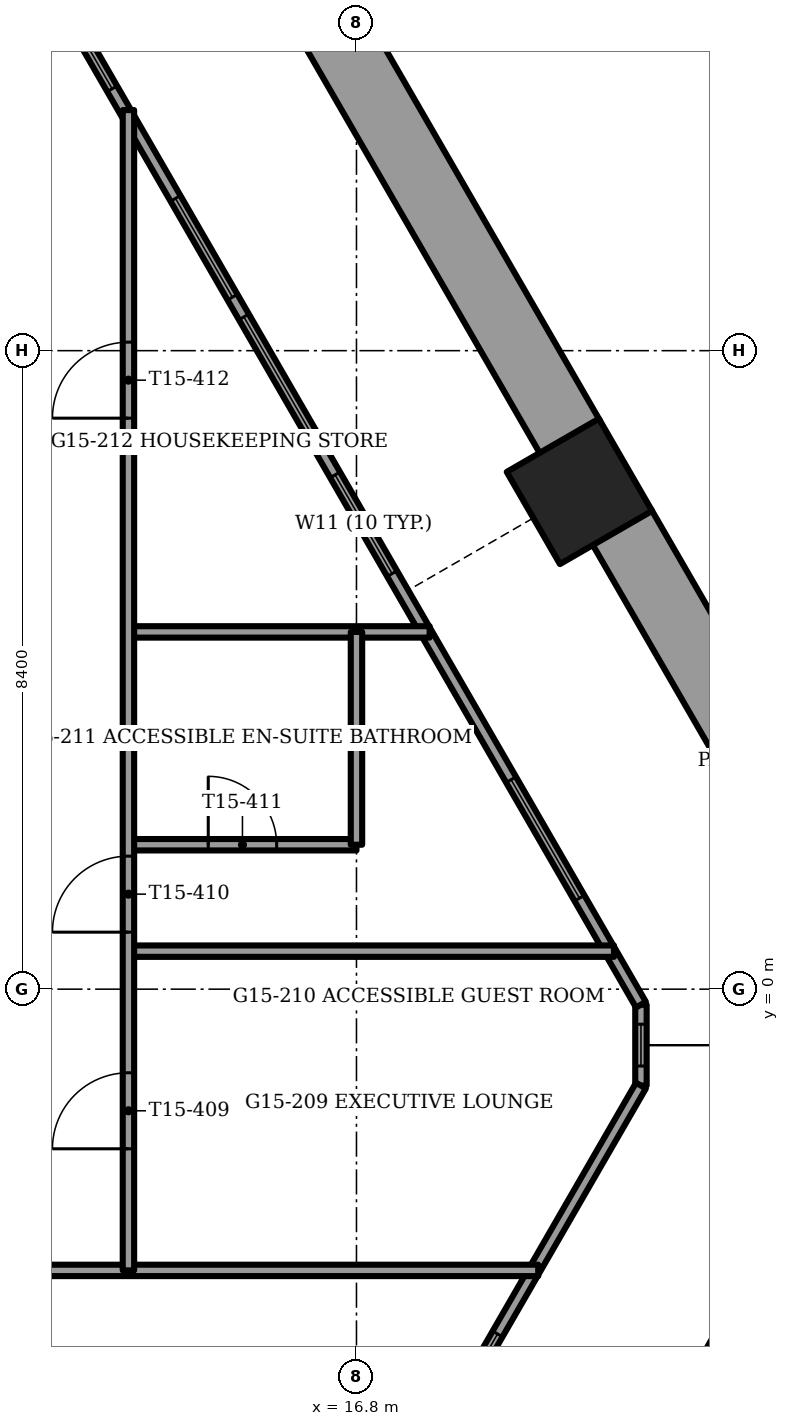
"""IFC4 building model, lengths in metres.
Left out: names, types, materials, properties, quantities, classifications, styles, units other than length and angle.
Written with IfcOpenShell. Run it as: python <this file> out.ifc"""

import sys

from ifc_helpers import new_model, si_unit, direction, frame, frame_2d, origin, origin_2d, place, context, subcontext, project, spatial, rectangle, extrude, element, fill, save


model = new_model("IFC4")
c1 = context("Model", 3, precision=1e-05, world=origin(), true_north=direction((0.0, 1.0)))
c2 = subcontext(c1, "Body", "Model", "MODEL_VIEW")
j1 = project(units=[si_unit("LENGTHUNIT", "METRE"), si_unit("PLANEANGLEUNIT", "RADIAN")], contexts=[c1])
p1 = place(None, origin())
s1 = spatial("IfcSite", under=j1, at=p1, CompositionType="ELEMENT")
p2 = place(p1, origin())
s2 = spatial("IfcBuilding", under=s1, at=p2, CompositionType="ELEMENT")
p3 = place(p2, frame((0.0, 0.0, 61.75)))
s3 = spatial("IfcBuildingStorey", under=s2, at=p3, CompositionType="ELEMENT", Elevation=61.75)
p4 = place(p3, frame((19.733, 6.549, -1.2), z_axis=(0.0, 0.0, 1.0), x_axis=(0.5, -0.866025403784, 0.0)))
e1 = element("IfcColumn", 1, at=p4, inside=s3, PredefinedType="COLUMN", context=c2, shape_type="SweptSolid", body=[
    extrude(rectangle(XDim=1.4, YDim=1.4, at=origin_2d()), origin(), (0.0, 0.0, 1.0), 3.75),
])
p5 = place(p3, frame((20.922, -6.461, 0.0), z_axis=(0.0, 0.0, 1.0), x_axis=(0.500014901547, 0.866016800201, 0.0)))
e2 = element("IfcWall", 2, at=p5, inside=s3, PredefinedType="PARAPET", context=c2, shape_type="SweptSolid", body=[
    extrude(rectangle(XDim=5.853, YDim=0.9, at=frame_2d((2.927, 0.0))), origin(), (0.0, 0.0, 1.0), 1.1),
])
p6 = place(p3, frame((23.849, -0.081, 0.0), z_axis=(0.0, 0.0, 1.0), x_axis=(-0.499999136801, 0.866025902152, 0.0)))
e3 = element("IfcWall", 3, at=p6, inside=s3, PredefinedType="PARAPET", context=c2, shape_type="SweptSolid", body=[
    extrude(rectangle(XDim=7.129, YDim=0.9, at=frame_2d((3.564, 0.0))), origin(), (0.0, 0.0, 1.0), 1.1),
])
p7 = place(p3, frame((19.615, 7.254, 0.0), z_axis=(0.0, 0.0, 1.0), x_axis=(-0.499997206141, 0.866027016814, 0.0)))
e4 = element("IfcWall", 4, at=p7, inside=s3, PredefinedType="PARAPET", context=c2, shape_type="SweptSolid", body=[
    extrude(rectangle(XDim=7.051, YDim=0.9, at=frame_2d((3.525, 0.0))), origin(), (0.0, 0.0, 1.0), 1.1),
])
p8 = place(p3, frame((11.37, -17.156, 0.0), z_axis=(0.0, 0.0, 1.0), x_axis=(0.499995095024, 0.866028235655, 0.0)))
e5 = element("IfcWall", 5, at=p8, inside=s3, PredefinedType="SOLIDWALL", context=c2, shape_type="SweptSolid", body=[
    extrude(rectangle(XDim=18.345, YDim=0.15, at=frame_2d((9.172, 0.0))), origin(), (0.0, 0.0, 1.0), 3.45),
])
p9 = place(p8, frame((1.073, 0.0, 0.15)))
e6 = element("IfcOpeningElement", 6, at=p9, cuts=e5, PredefinedType="OPENING", context=c2, shape_type="SweptSolid", body=[
    extrude(rectangle(XDim=1.8, YDim=2.85, at=frame_2d((0.9, 1.425))), frame((0.0, 0.075, 0.0), z_axis=(0.0, -1.0, 0.0), x_axis=(1.0, 0.0, 0.0)), (0.0, 0.0, 1.0), 0.15),
])
p10 = place(p8, frame((3.172, 0.0, 0.0)))
e7 = element("IfcOpeningElement", 7, at=p10, cuts=e5, PredefinedType="OPENING", context=c2, shape_type="SweptSolid", body=[
    extrude(rectangle(XDim=1.5, YDim=2.4, at=frame_2d((0.75, 1.2))), frame((0.0, 0.075, 0.0), z_axis=(0.0, -1.0, 0.0), x_axis=(1.0, 0.0, 0.0)), (0.0, 0.0, 1.0), 0.15),
])
p11 = place(p8, frame((5.272, 0.0, 0.15)))
e8 = element("IfcOpeningElement", 8, at=p11, cuts=e5, PredefinedType="OPENING", context=c2, shape_type="SweptSolid", body=[
    extrude(rectangle(XDim=1.8, YDim=2.85, at=frame_2d((0.9, 1.425))), frame((0.0, 0.075, 0.0), z_axis=(0.0, -1.0, 0.0), x_axis=(1.0, 0.0, 0.0)), (0.0, 0.0, 1.0), 0.15),
])
p12 = place(p8, frame((7.372, 0.0, 0.0)))
e9 = element("IfcOpeningElement", 9, at=p12, cuts=e5, PredefinedType="OPENING", context=c2, shape_type="SweptSolid", body=[
    extrude(rectangle(XDim=1.5, YDim=2.4, at=frame_2d((0.75, 1.2))), frame((0.0, 0.075, 0.0), z_axis=(0.0, -1.0, 0.0), x_axis=(1.0, 0.0, 0.0)), (0.0, 0.0, 1.0), 0.15),
])
p13 = place(p8, frame((9.472, 0.0, 0.15)))
e10 = element("IfcOpeningElement", 10, at=p13, cuts=e5, PredefinedType="OPENING", context=c2, shape_type="SweptSolid", body=[
    extrude(rectangle(XDim=1.8, YDim=2.85, at=frame_2d((0.9, 1.425))), frame((0.0, 0.075, 0.0), z_axis=(0.0, -1.0, 0.0), x_axis=(1.0, 0.0, 0.0)), (0.0, 0.0, 1.0), 0.15),
])
p14 = place(p8, frame((11.573, 0.0, 0.0)))
e11 = element("IfcOpeningElement", 11, at=p14, cuts=e5, PredefinedType="OPENING", context=c2, shape_type="SweptSolid", body=[
    extrude(rectangle(XDim=1.5, YDim=2.4, at=frame_2d((0.75, 1.2))), frame((0.0, 0.075, 0.0), z_axis=(0.0, -1.0, 0.0), x_axis=(1.0, 0.0, 0.0)), (0.0, 0.0, 1.0), 0.15),
])
p15 = place(p8, frame((13.672, 0.0, 0.15)))
e12 = element("IfcOpeningElement", 12, at=p15, cuts=e5, PredefinedType="OPENING", context=c2, shape_type="SweptSolid", body=[
    extrude(rectangle(XDim=0.9, YDim=2.85, at=frame_2d((0.45, 1.425))), frame((0.0, 0.075, 0.0), z_axis=(0.0, -1.0, 0.0), x_axis=(1.0, 0.0, 0.0)), (0.0, 0.0, 1.0), 0.15),
])
p16 = place(p3, frame((20.543, -0.204, 0.0), z_axis=(0.0, 0.0, 1.0), x_axis=(-0.500005515081, 0.866022219628, 0.0)))
e13 = element("IfcWall", 13, at=p16, inside=s3, PredefinedType="SOLIDWALL", context=c2, shape_type="SweptSolid", body=[
    extrude(rectangle(XDim=23.667, YDim=0.15, at=frame_2d((11.833, 0.0))), origin(), (0.0, 0.0, 1.0), 3.45),
])
p17 = place(p16, frame((6.548, 0.0, 0.15)))
e14 = element("IfcOpeningElement", 14, at=p17, cuts=e13, PredefinedType="OPENING", context=c2, shape_type="SweptSolid", body=[
    extrude(rectangle(XDim=1.5, YDim=2.85, at=frame_2d((0.75, 1.425))), frame((0.0, 0.075, 0.0), z_axis=(0.0, -1.0, 0.0), x_axis=(1.0, 0.0, 0.0)), (0.0, 0.0, 1.0), 0.15),
])
p18 = place(p16, frame((8.648, 0.0, 0.15)))
e15 = element("IfcOpeningElement", 15, at=p18, cuts=e13, PredefinedType="OPENING", context=c2, shape_type="SweptSolid", body=[
    extrude(rectangle(XDim=1.8, YDim=2.85, at=frame_2d((0.9, 1.425))), frame((0.0, 0.075, 0.0), z_axis=(0.0, -1.0, 0.0), x_axis=(1.0, 0.0, 0.0)), (0.0, 0.0, 1.0), 0.15),
])
p19 = place(p16, frame((10.748, 0.0, 0.15)))
e16 = element("IfcOpeningElement", 16, at=p19, cuts=e13, PredefinedType="OPENING", context=c2, shape_type="SweptSolid", body=[
    extrude(rectangle(XDim=1.5, YDim=2.85, at=frame_2d((0.75, 1.425))), frame((0.0, 0.075, 0.0), z_axis=(0.0, -1.0, 0.0), x_axis=(1.0, 0.0, 0.0)), (0.0, 0.0, 1.0), 0.15),
])
p20 = place(p16, frame((13.914, 0.0, 0.15)))
e17 = element("IfcOpeningElement", 17, at=p20, cuts=e13, PredefinedType="OPENING", context=c2, shape_type="SweptSolid", body=[
    extrude(rectangle(XDim=0.9, YDim=2.85, at=frame_2d((0.45, 1.425))), frame((0.0, 0.075, 0.0), z_axis=(0.0, -1.0, 0.0), x_axis=(1.0, 0.0, 0.0)), (0.0, 0.0, 1.0), 0.15),
])
p21 = place(p16, frame((14.948, 0.0, 0.15)))
e18 = element("IfcOpeningElement", 18, at=p21, cuts=e13, PredefinedType="OPENING", context=c2, shape_type="SweptSolid", body=[
    extrude(rectangle(XDim=1.5, YDim=2.85, at=frame_2d((0.75, 1.425))), frame((0.0, 0.075, 0.0), z_axis=(0.0, -1.0, 0.0), x_axis=(1.0, 0.0, 0.0)), (0.0, 0.0, 1.0), 0.15),
])
p22 = place(p16, frame((19.148, 0.0, 0.0)))
e19 = element("IfcOpeningElement", 19, at=p22, cuts=e13, PredefinedType="OPENING", context=c2, shape_type="SweptSolid", body=[
    extrude(rectangle(XDim=1.5, YDim=2.4, at=frame_2d((0.75, 1.2))), frame((0.0, 0.075, 0.0), z_axis=(0.0, -1.0, 0.0), x_axis=(1.0, 0.0, 0.0)), (0.0, 0.0, 1.0), 0.15),
])
p23 = place(p16, frame((1.617, 0.0, 0.15)))
e20 = element("IfcOpeningElement", 20, at=p23, cuts=e13, PredefinedType="OPENING", context=c2, shape_type="SweptSolid", body=[
    extrude(rectangle(XDim=1.8, YDim=2.73, at=frame_2d((0.9, 1.365))), frame((0.0, 0.075, 0.0), z_axis=(0.0, -1.0, 0.0), x_axis=(1.0, 0.0, 0.0)), (0.0, 0.0, 1.0), 0.15),
])
p24 = place(p16, frame((21.458, 0.0, 0.15)))
e21 = element("IfcOpeningElement", 21, at=p24, cuts=e13, PredefinedType="OPENING", context=c2, shape_type="SweptSolid", body=[
    extrude(rectangle(XDim=1.8, YDim=2.73, at=frame_2d((0.9, 1.365))), frame((0.0, 0.075, 0.0), z_axis=(0.0, -1.0, 0.0), x_axis=(1.0, 0.0, 0.0)), (0.0, 0.0, 1.0), 0.15),
])
p25 = place(p3, frame((20.543, -1.269, 0.0), z_axis=(0.0, 0.0, 1.0), x_axis=(0.0, 1.0, 0.0)))
e22 = element("IfcWall", 22, at=p25, inside=s3, PredefinedType="SOLIDWALL", context=c2, shape_type="SweptSolid", body=[
    extrude(rectangle(XDim=1.065, YDim=0.15, at=frame_2d((0.532, 0.0))), origin(), (0.0, 0.0, 1.0), 3.45),
])
p26 = place(p25, frame((0.258, 0.0, 0.15)))
e23 = element("IfcOpeningElement", 23, at=p26, cuts=e22, PredefinedType="OPENING", context=c2, shape_type="SweptSolid", body=[
    extrude(rectangle(XDim=0.55, YDim=2.85, at=frame_2d((0.275, 1.425))), frame((0.0, 0.075, 0.0), z_axis=(0.0, -1.0, 0.0), x_axis=(1.0, 0.0, 0.0)), (0.0, 0.0, 1.0), 0.15),
])
p27 = place(p3, frame((9.16, -3.7, 0.0), z_axis=(0.0, 0.0, 1.0), x_axis=(1.0, 0.0, 0.0)))
e24 = element("IfcWall", 24, at=p27, inside=s3, PredefinedType="PARTITIONING", context=c2, shape_type="SweptSolid", body=[
    extrude(rectangle(XDim=10.031, YDim=0.15, at=frame_2d((5.016, 0.0))), origin(), (0.0, 0.0, 1.0), 3.45),
])
p28 = place(p27, frame((1.84, 0.0, 0.0)))
e25 = element("IfcOpeningElement", 25, at=p28, cuts=e24, PredefinedType="OPENING", context=c2, shape_type="SweptSolid", body=[
    extrude(rectangle(XDim=1.0, YDim=2.1, at=frame_2d((0.5, 1.05))), frame((0.0, 0.075, 0.0), z_axis=(0.0, -1.0, 0.0), x_axis=(1.0, 0.0, 0.0)), (0.0, 0.0, 1.0), 0.15),
])
p29 = place(p3, frame((13.8, 0.5, 0.0), z_axis=(0.0, 0.0, 1.0), x_axis=(1.0, 0.0, 0.0)))
e26 = element("IfcWall", 26, at=p29, inside=s3, PredefinedType="PARTITIONING", context=c2, shape_type="SweptSolid", body=[
    extrude(rectangle(XDim=6.388, YDim=0.15, at=frame_2d((3.194, 0.0))), origin(), (0.0, 0.0, 1.0), 3.45),
])
p30 = place(p3, frame((13.8, 1.9, 0.0), z_axis=(0.0, 0.0, 1.0), x_axis=(1.0, 0.0, 0.0)))
e27 = element("IfcWall", 27, at=p30, inside=s3, PredefinedType="PARTITIONING", context=c2, shape_type="SweptSolid", body=[
    extrude(rectangle(XDim=3.0, YDim=0.15, at=frame_2d((1.5, 0.0))), origin(), (0.0, 0.0, 1.0), 3.45),
])
p31 = place(p30, frame((1.05, 0.0, 0.0)))
e28 = element("IfcOpeningElement", 28, at=p31, cuts=e27, PredefinedType="OPENING", context=c2, shape_type="SweptSolid", body=[
    extrude(rectangle(XDim=0.9, YDim=2.1, at=frame_2d((0.45, 1.05))), frame((0.0, 0.075, 0.0), z_axis=(0.0, -1.0, 0.0), x_axis=(1.0, 0.0, 0.0)), (0.0, 0.0, 1.0), 0.15),
])
p32 = place(p3, frame((13.8, 4.7, 0.0), z_axis=(0.0, 0.0, 1.0), x_axis=(1.0, 0.0, 0.0)))
e29 = element("IfcWall", 29, at=p32, inside=s3, PredefinedType="PARTITIONING", context=c2, shape_type="SweptSolid", body=[
    extrude(rectangle(XDim=3.963, YDim=0.15, at=frame_2d((1.981, 0.0))), origin(), (0.0, 0.0, 1.0), 3.45),
])
p33 = place(p3, frame((16.8, 1.9, 0.0), z_axis=(0.0, 0.0, 1.0), x_axis=(0.0, 1.0, 0.0)))
e30 = element("IfcWall", 30, at=p33, inside=s3, PredefinedType="PARTITIONING", context=c2, shape_type="SweptSolid", body=[
    extrude(rectangle(XDim=2.8, YDim=0.15, at=frame_2d((1.4, 0.0))), origin(), (0.0, 0.0, 1.0), 3.45),
])
p34 = place(p3, frame((13.8, -3.7, 0.0), z_axis=(0.0, 0.0, 1.0), x_axis=(0.0, 1.0, 0.0)))
e31 = element("IfcWall", 31, at=p34, inside=s3, PredefinedType="PARTITIONING", context=c2, shape_type="SweptSolid", body=[
    extrude(rectangle(XDim=15.265, YDim=0.15, at=frame_2d((7.632, 0.0))), origin(), (0.0, 0.0, 1.0), 3.45),
])
p35 = place(p34, frame((1.6, 0.0, 0.0)))
e32 = element("IfcOpeningElement", 32, at=p35, cuts=e31, PredefinedType="OPENING", context=c2, shape_type="SweptSolid", body=[
    extrude(rectangle(XDim=1.0, YDim=2.1, at=frame_2d((0.5, 1.05))), frame((0.0, 0.075, 0.0), z_axis=(0.0, -1.0, 0.0), x_axis=(1.0, 0.0, 0.0)), (0.0, 0.0, 1.0), 0.15),
])
p36 = place(p34, frame((4.45, 0.0, 0.0)))
e33 = element("IfcOpeningElement", 33, at=p36, cuts=e31, PredefinedType="OPENING", context=c2, shape_type="SweptSolid", body=[
    extrude(rectangle(XDim=1.0, YDim=2.1, at=frame_2d((0.5, 1.05))), frame((0.0, 0.075, 0.0), z_axis=(0.0, -1.0, 0.0), x_axis=(1.0, 0.0, 0.0)), (0.0, 0.0, 1.0), 0.15),
])
p37 = place(p34, frame((11.212, 0.0, 0.0)))
e34 = element("IfcOpeningElement", 34, at=p37, cuts=e31, PredefinedType="OPENING", context=c2, shape_type="SweptSolid", body=[
    extrude(rectangle(XDim=1.0, YDim=2.1, at=frame_2d((0.5, 1.05))), frame((0.0, 0.075, 0.0), z_axis=(0.0, -1.0, 0.0), x_axis=(1.0, 0.0, 0.0)), (0.0, 0.0, 1.0), 0.15),
])
p38 = place(p15, origin())
e35 = element("IfcWindow", 35, at=p38, inside=s3, PartitioningType="SINGLE_PANEL", PredefinedType="WINDOW", context=c2, shape_type="SweptSolid", body=[
    extrude(rectangle(XDim=0.9, YDim=2.85, at=frame_2d((0.45, 1.425))), frame((0.0, 0.03, 0.0), z_axis=(0.0, -1.0, 0.0), x_axis=(1.0, 0.0, 0.0)), (0.0, 0.0, 1.0), 0.06),
])
fill(e12, e35)
p39 = place(p17, origin())
e36 = element("IfcWindow", 36, at=p39, inside=s3, PartitioningType="SINGLE_PANEL", PredefinedType="WINDOW", context=c2, shape_type="SweptSolid", body=[
    extrude(rectangle(XDim=1.5, YDim=2.85, at=frame_2d((0.75, 1.425))), frame((0.0, 0.03, 0.0), z_axis=(0.0, -1.0, 0.0), x_axis=(1.0, 0.0, 0.0)), (0.0, 0.0, 1.0), 0.06),
])
fill(e14, e36)
p40 = place(p18, origin())
e37 = element("IfcWindow", 37, at=p40, inside=s3, PartitioningType="SINGLE_PANEL", PredefinedType="WINDOW", context=c2, shape_type="SweptSolid", body=[
    extrude(rectangle(XDim=1.8, YDim=2.85, at=frame_2d((0.9, 1.425))), frame((0.0, 0.03, 0.0), z_axis=(0.0, -1.0, 0.0), x_axis=(1.0, 0.0, 0.0)), (0.0, 0.0, 1.0), 0.06),
])
fill(e15, e37)
p41 = place(p19, origin())
e38 = element("IfcWindow", 38, at=p41, inside=s3, PartitioningType="SINGLE_PANEL", PredefinedType="WINDOW", context=c2, shape_type="SweptSolid", body=[
    extrude(rectangle(XDim=1.5, YDim=2.85, at=frame_2d((0.75, 1.425))), frame((0.0, 0.03, 0.0), z_axis=(0.0, -1.0, 0.0), x_axis=(1.0, 0.0, 0.0)), (0.0, 0.0, 1.0), 0.06),
])
fill(e16, e38)
p42 = place(p20, origin())
e39 = element("IfcWindow", 39, at=p42, inside=s3, PartitioningType="SINGLE_PANEL", PredefinedType="WINDOW", context=c2, shape_type="SweptSolid", body=[
    extrude(rectangle(XDim=0.9, YDim=2.85, at=frame_2d((0.45, 1.425))), frame((0.0, 0.03, 0.0), z_axis=(0.0, -1.0, 0.0), x_axis=(1.0, 0.0, 0.0)), (0.0, 0.0, 1.0), 0.06),
])
fill(e17, e39)
p43 = place(p23, origin())
e40 = element("IfcWindow", 40, at=p43, inside=s3, PartitioningType="SINGLE_PANEL", PredefinedType="WINDOW", context=c2, shape_type="SweptSolid", body=[
    extrude(rectangle(XDim=1.8, YDim=2.73, at=frame_2d((0.9, 1.365))), frame((0.0, 0.03, 0.0), z_axis=(0.0, -1.0, 0.0), x_axis=(1.0, 0.0, 0.0)), (0.0, 0.0, 1.0), 0.06),
])
fill(e20, e40)
p44 = place(p26, origin())
e41 = element("IfcWindow", 41, at=p44, inside=s3, PartitioningType="SINGLE_PANEL", PredefinedType="WINDOW", context=c2, shape_type="SweptSolid", body=[
    extrude(rectangle(XDim=0.55, YDim=2.85, at=frame_2d((0.275, 1.425))), frame((0.0, 0.03, 0.0), z_axis=(0.0, -1.0, 0.0), x_axis=(1.0, 0.0, 0.0)), (0.0, 0.0, 1.0), 0.06),
])
fill(e23, e41)
p45 = place(p35, origin())
e42 = element("IfcDoor", 42, at=p45, inside=s3, OperationType="SINGLE_SWING_LEFT", PredefinedType="DOOR", context=c2, shape_type="SweptSolid", body=[
    extrude(rectangle(XDim=1.0, YDim=2.1, at=frame_2d((0.5, 1.05))), frame((0.0, 0.025, 0.0), z_axis=(0.0, -1.0, 0.0), x_axis=(1.0, 0.0, 0.0)), (0.0, 0.0, 1.0), 0.05),
])
fill(e32, e42)
p46 = place(p36, origin())
e43 = element("IfcDoor", 43, at=p46, inside=s3, OperationType="SINGLE_SWING_LEFT", PredefinedType="DOOR", context=c2, shape_type="SweptSolid", body=[
    extrude(rectangle(XDim=1.0, YDim=2.1, at=frame_2d((0.5, 1.05))), frame((0.0, 0.025, 0.0), z_axis=(0.0, -1.0, 0.0), x_axis=(1.0, 0.0, 0.0)), (0.0, 0.0, 1.0), 0.05),
])
fill(e33, e43)
p47 = place(p31, origin())
e44 = element("IfcDoor", 44, at=p47, inside=s3, OperationType="SINGLE_SWING_LEFT", PredefinedType="DOOR", context=c2, shape_type="SweptSolid", body=[
    extrude(rectangle(XDim=0.9, YDim=2.1, at=frame_2d((0.45, 1.05))), frame((0.0, 0.025, 0.0), z_axis=(0.0, -1.0, 0.0), x_axis=(1.0, 0.0, 0.0)), (0.0, 0.0, 1.0), 0.05),
])
fill(e28, e44)
p48 = place(p37, origin())
e45 = element("IfcDoor", 45, at=p48, inside=s3, OperationType="SINGLE_SWING_LEFT", PredefinedType="DOOR", context=c2, shape_type="SweptSolid", body=[
    extrude(rectangle(XDim=1.0, YDim=2.1, at=frame_2d((0.5, 1.05))), frame((0.0, 0.025, 0.0), z_axis=(0.0, -1.0, 0.0), x_axis=(1.0, 0.0, 0.0)), (0.0, 0.0, 1.0), 0.05),
])
fill(e34, e45)
save(model, sys.argv[1])
